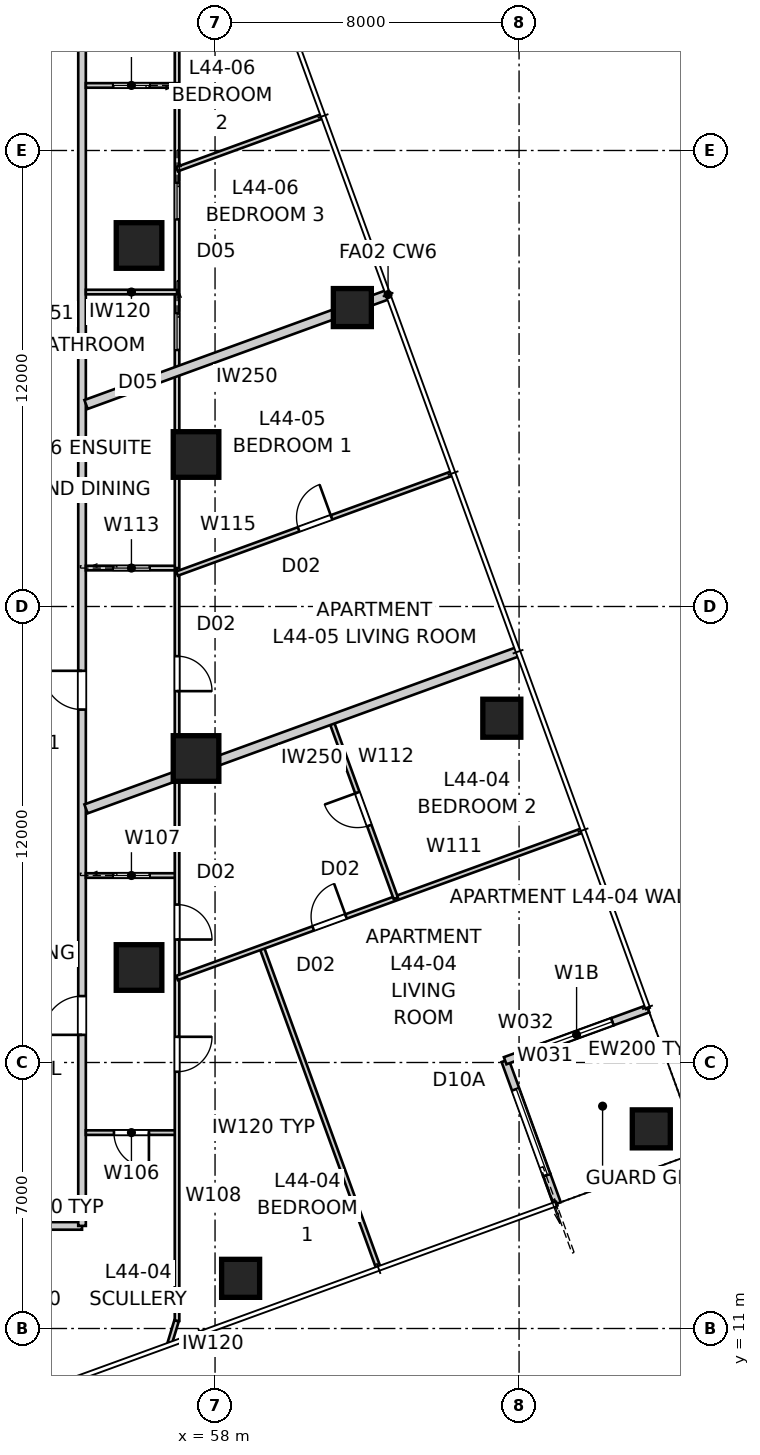
"""IFC4 building model, lengths in metres.
Left out: names, types, materials, properties, quantities, classifications, styles, units other than length and angle.
Written with IfcOpenShell. Run it as: python <this file> out.ifc"""

import sys

from ifc_helpers import new_model, si_unit, direction, frame, frame_2d, origin, origin_2d, place, context, subcontext, project, spatial, rectangle, extrude, element, fill, save


model = new_model("IFC4")
c1 = context("Model", 3, precision=1e-05, world=origin(), true_north=direction((0.0, 1.0)))
c2 = subcontext(c1, "Body", "Model", "MODEL_VIEW")
j1 = project(units=[si_unit("LENGTHUNIT", "METRE"), si_unit("PLANEANGLEUNIT", "RADIAN")], contexts=[c1])
p1 = place(None, origin())
s1 = spatial("IfcSite", under=j1, at=p1, CompositionType="ELEMENT")
p2 = place(p1, origin())
s2 = spatial("IfcBuilding", under=s1, at=p2, CompositionType="ELEMENT")
p3 = place(p2, frame((0.0, 0.0, 160.8)))
s3 = spatial("IfcBuildingStorey", under=s2, at=p3, CompositionType="ELEMENT", Elevation=160.8)
for number, where, z_axis, x_axis in (
    (1, (58.673, 12.32, 0.0), (0.0, 0.0, 1.0), (1.0, 0.0, 0.0)),
    (2, (69.479, 16.253, 0.0), (0.0, 0.0, 1.0), (1.0, 0.0, 0.0)),
    (3, (65.546, 27.06, 0.0), (0.0, 0.0, 1.0), (1.0, 0.0, 0.0)),
    (4, (61.613, 37.866, 0.0), (0.0, 0.0, 1.0), (1.0, 0.0, 0.0)),
):
    element("IfcColumn", number, at=place(p3, frame(where, z_axis=z_axis, x_axis=x_axis)), inside=s3, PredefinedType="COLUMN", context=c2, shape_type="SweptSolid", body=[
        extrude(rectangle(XDim=1.0, YDim=1.0, at=origin_2d()), origin(), (0.0, 0.0, 1.0), 3.4),
    ])
for number, where, z_axis, x_axis in (
    (5, (57.5, 26.0, 0.0), (0.0, 0.0, 1.0), (1.0, 0.0, 0.0)),
    (6, (57.5, 34.0, 0.0), (0.0, 0.0, 1.0), (1.0, 0.0, 0.0)),
    (7, (56.0, 39.5, 0.0), (0.0, 0.0, 1.0), (1.0, 0.0, 0.0)),
    (8, (56.0, 20.5, 0.0), (0.0, 0.0, 1.0), (1.0, 0.0, 0.0)),
):
    element("IfcColumn", number, at=place(p3, frame(where, z_axis=z_axis, x_axis=x_axis)), inside=s3, PredefinedType="COLUMN", context=c2, shape_type="SweptSolid", body=[
        extrude(rectangle(XDim=1.2, YDim=1.2, at=origin_2d()), origin(), (0.0, 0.0, 1.0), 3.4),
    ])
p4 = place(p3, frame((67.002, 14.288, 0.0), z_axis=(0.0, 0.0, 1.0), x_axis=(-0.342110593602, 0.939659694648, 0.0)))
e9 = element("IfcWall", 9, at=p4, inside=s3, PredefinedType="SOLIDWALL", context=c2, shape_type="SweptSolid", body=[
    extrude(rectangle(XDim=0.8, YDim=0.2, at=frame_2d((0.4, 0.0))), origin(), (0.0, 0.0, 1.0), 3.25),
])
p5 = place(p3, frame((66.729, 15.04, 0.0), z_axis=(0.0, 0.0, 1.0), x_axis=(-0.342018703306, 0.939693144909, 0.0)))
e10 = element("IfcWall", 10, at=p5, inside=s3, PredefinedType="SOLIDWALL", context=c2, shape_type="SweptSolid", body=[
    extrude(rectangle(XDim=3.2, YDim=0.2, at=frame_2d((1.6, 0.0))), origin(), (0.0, 0.0, 1.0), 2.722),
])
p6 = place(p5, origin())
e11 = element("IfcOpeningElement", 11, at=p6, cuts=e10, PredefinedType="OPENING", context=c2, shape_type="SweptSolid", body=[
    extrude(rectangle(XDim=2.4, YDim=2.1, at=frame_2d((1.2, 1.05))), frame((0.0, 0.11, 0.0), z_axis=(0.0, -1.0, 0.0), x_axis=(1.0, 0.0, 0.0)), (0.0, 0.0, 1.0), 0.22),
])
p7 = place(p3, frame((65.634, 18.047, 0.0), z_axis=(0.0, 0.0, 1.0), x_axis=(0.939712609717, 0.341965219194, 0.0)))
e12 = element("IfcWall", 12, at=p7, inside=s3, PredefinedType="SOLIDWALL", context=c2, shape_type="SweptSolid", body=[
    extrude(rectangle(XDim=3.0, YDim=0.2, at=frame_2d((1.5, 0.0))), origin(), (0.0, 0.0, 1.0), 2.722),
])
p8 = place(p7, frame((1.0, 0.0, 0.45)))
e13 = element("IfcOpeningElement", 13, at=p8, cuts=e12, PredefinedType="OPENING", context=c2, shape_type="SweptSolid", body=[
    extrude(rectangle(XDim=2.0, YDim=1.8, at=frame_2d((1.0, 0.9))), frame((0.0, 0.11, 0.0), z_axis=(0.0, -1.0, 0.0), x_axis=(1.0, 0.0, 0.0)), (0.0, 0.0, 1.0), 0.22),
])
p9 = place(p3, frame((68.453, 19.073, 0.0), z_axis=(0.0, 0.0, 1.0), x_axis=(0.939686455819, 0.342037080957, 0.0)))
e14 = element("IfcWall", 14, at=p9, inside=s3, PredefinedType="SOLIDWALL", context=c2, shape_type="SweptSolid", body=[
    extrude(rectangle(XDim=1.0, YDim=0.2, at=frame_2d((0.5, 0.0))), origin(), (0.0, 0.0, 1.0), 3.25),
])
p10 = place(p3, frame((49.242, 13.7, 0.0), z_axis=(0.0, 0.0, 1.0), x_axis=(1.0, 0.0, 0.0)))
e15 = element("IfcWall", 15, at=p10, inside=s3, PredefinedType="PARTITIONING", context=c2, shape_type="SweptSolid", body=[
    extrude(rectangle(XDim=5.258, YDim=0.2, at=frame_2d((2.629, 0.0))), origin(), (0.0, 0.0, 1.0), 3.25),
])
p11 = place(p3, frame((54.5, 13.7, 0.0), z_axis=(0.0, 0.0, 1.0), x_axis=(0.0, 1.0, 0.0)))
e16 = element("IfcWall", 16, at=p11, inside=s3, PredefinedType="PARTITIONING", context=c2, shape_type="SweptSolid", body=[
    extrude(rectangle(XDim=33.4, YDim=0.2, at=frame_2d((16.7, 0.0))), origin(), (0.0, 0.0, 1.0), 3.25),
])
p12 = place(p11, frame((5.028, 0.0, 0.0)))
e17 = element("IfcOpeningElement", 17, at=p12, cuts=e16, PredefinedType="OPENING", context=c2, shape_type="SweptSolid", body=[
    extrude(rectangle(XDim=1.02, YDim=2.1, at=frame_2d((0.51, 1.05))), frame((0.0, 0.11, 0.0), z_axis=(0.0, -1.0, 0.0), x_axis=(1.0, 0.0, 0.0)), (0.0, 0.0, 1.0), 0.22),
])
p13 = place(p11, frame((13.587, 0.0, 0.0)))
e18 = element("IfcOpeningElement", 18, at=p13, cuts=e16, PredefinedType="OPENING", context=c2, shape_type="SweptSolid", body=[
    extrude(rectangle(XDim=1.02, YDim=2.34, at=frame_2d((0.51, 1.17))), frame((0.0, 0.11, 0.0), z_axis=(0.0, -1.0, 0.0), x_axis=(1.0, 0.0, 0.0)), (0.0, 0.0, 1.0), 0.22),
])
p14 = place(p3, frame((62.553, 38.208, 0.0), z_axis=(0.0, 0.0, 1.0), x_axis=(-0.939695617736, -0.342011909161, 0.0)))
e19 = element("IfcWall", 19, at=p14, inside=s3, PredefinedType="PARTITIONING", context=c2, shape_type="SweptSolid", body=[
    extrude(rectangle(XDim=8.458, YDim=0.25, at=frame_2d((4.229, 0.0))), origin(), (0.0, 0.0, 1.0), 3.25),
])
p15 = place(p3, frame((65.973, 28.812, 0.0), z_axis=(0.0, 0.0, 1.0), x_axis=(-0.939693801585, -0.342016899091, 0.0)))
e20 = element("IfcWall", 20, at=p15, inside=s3, PredefinedType="PARTITIONING", context=c2, shape_type="SweptSolid", body=[
    extrude(rectangle(XDim=12.097, YDim=0.25, at=frame_2d((6.049, 0.0))), origin(), (0.0, 0.0, 1.0), 3.25),
])
p16 = place(p3, frame((57.0, 16.155, 0.0), z_axis=(0.0, 0.0, 1.0), x_axis=(-1.0, 0.0, 0.0)))
e21 = element("IfcWall", 21, at=p16, inside=s3, PredefinedType="PARTITIONING", context=c2, shape_type="SweptSolid", body=[
    extrude(rectangle(XDim=2.4, YDim=0.12, at=frame_2d((1.2, 0.0))), origin(), (0.0, 0.0, 1.0), 3.25),
])
p17 = place(p16, frame((0.74, 0.0, 0.0)))
e22 = element("IfcOpeningElement", 22, at=p17, cuts=e21, PredefinedType="OPENING", context=c2, shape_type="SweptSolid", body=[
    extrude(rectangle(XDim=0.92, YDim=2.34, at=frame_2d((0.46, 1.17))), frame((0.0, 0.07, 0.0), z_axis=(0.0, -1.0, 0.0), x_axis=(1.0, 0.0, 0.0)), (0.0, 0.0, 1.0), 0.14),
])
p18 = place(p3, frame((54.6, 22.921, 0.0), z_axis=(0.0, 0.0, 1.0), x_axis=(1.0, 0.0, 0.0)))
e23 = element("IfcWall", 23, at=p18, inside=s3, PredefinedType="PARTITIONING", context=c2, shape_type="SweptSolid", body=[
    extrude(rectangle(XDim=2.4, YDim=0.12, at=frame_2d((1.2, 0.0))), origin(), (0.0, 0.0, 1.0), 3.25),
])
p19 = place(p18, frame((0.72, 0.0, 0.0)))
e24 = element("IfcOpeningElement", 24, at=p19, cuts=e23, PredefinedType="OPENING", context=c2, shape_type="SweptSolid", body=[
    extrude(rectangle(XDim=0.96, YDim=2.1, at=frame_2d((0.48, 1.05))), frame((0.0, 0.07, 0.0), z_axis=(0.0, -1.0, 0.0), x_axis=(1.0, 0.0, 0.0)), (0.0, 0.0, 1.0), 0.14),
])
p20 = place(p3, frame((57.0, 30.92, 0.0), z_axis=(0.0, 0.0, 1.0), x_axis=(0.0, -1.0, 0.0)))
e25 = element("IfcWall", 25, at=p20, inside=s3, PredefinedType="PARTITIONING", context=c2, shape_type="SweptSolid", body=[
    extrude(rectangle(XDim=19.72, YDim=0.12, at=frame_2d((9.86, 0.0))), origin(), (0.0, 0.0, 1.0), 2.55),
])
p21 = place(p20, frame((12.243, 0.0, 0.0)))
e26 = element("IfcOpeningElement", 26, at=p21, cuts=e25, PredefinedType="OPENING", context=c2, shape_type="SweptSolid", body=[
    extrude(rectangle(XDim=0.92, YDim=2.34, at=frame_2d((0.46, 1.17))), frame((0.0, 0.07, 0.0), z_axis=(0.0, -1.0, 0.0), x_axis=(1.0, 0.0, 0.0)), (0.0, 0.0, 1.0), 0.14),
])
p22 = place(p20, frame((8.764, 0.0, 0.0)))
e27 = element("IfcOpeningElement", 27, at=p22, cuts=e25, PredefinedType="OPENING", context=c2, shape_type="SweptSolid", body=[
    extrude(rectangle(XDim=0.92, YDim=2.34, at=frame_2d((0.46, 1.17))), frame((0.0, 0.07, 0.0), z_axis=(0.0, -1.0, 0.0), x_axis=(1.0, 0.0, 0.0)), (0.0, 0.0, 1.0), 0.14),
])
p23 = place(p20, frame((2.227, 0.0, 0.0)))
e28 = element("IfcOpeningElement", 28, at=p23, cuts=e25, PredefinedType="OPENING", context=c2, shape_type="SweptSolid", body=[
    extrude(rectangle(XDim=0.92, YDim=2.34, at=frame_2d((0.46, 1.17))), frame((0.0, 0.07, 0.0), z_axis=(0.0, -1.0, 0.0), x_axis=(1.0, 0.0, 0.0)), (0.0, 0.0, 1.0), 0.14),
])
p24 = place(p3, frame((56.987, 11.2, 0.0), z_axis=(0.0, 0.0, 1.0), x_axis=(-0.290455219909, -0.956888585588, 0.0)))
e29 = element("IfcWall", 29, at=p24, inside=s3, PredefinedType="PARTITIONING", context=c2, shape_type="SweptSolid", body=[
    extrude(rectangle(XDim=0.605, YDim=0.12, at=frame_2d((0.303, 0.0))), origin(), (0.0, 0.0, 1.0), 3.25),
])
p25 = place(p3, frame((62.29, 12.615, 0.0), z_axis=(0.0, 0.0, 1.0), x_axis=(-0.342038393654, 0.939685978009, 0.0)))
e30 = element("IfcWall", 30, at=p25, inside=s3, PredefinedType="PARTITIONING", context=c2, shape_type="SweptSolid", body=[
    extrude(rectangle(XDim=8.96, YDim=0.12, at=frame_2d((4.48, 0.0))), origin(), (0.0, 0.0, 1.0), 3.25),
])
p26 = place(p3, frame((57.0, 20.225, 0.0), z_axis=(0.0, 0.0, 1.0), x_axis=(0.939693965364, 0.342016449105, 0.0)))
e31 = element("IfcWall", 31, at=p26, inside=s3, PredefinedType="PARTITIONING", context=c2, shape_type="SweptSolid", body=[
    extrude(rectangle(XDim=11.328, YDim=0.12, at=frame_2d((5.664, 0.0))), origin(), (0.0, 0.0, 1.0), 3.25),
])
p27 = place(p26, frame((3.812, 0.0, 0.0)))
e32 = element("IfcOpeningElement", 32, at=p27, cuts=e31, PredefinedType="OPENING", context=c2, shape_type="SweptSolid", body=[
    extrude(rectangle(XDim=0.92, YDim=2.34, at=frame_2d((0.46, 1.17))), frame((0.0, 0.07, 0.0), z_axis=(0.0, -1.0, 0.0), x_axis=(1.0, 0.0, 0.0)), (0.0, 0.0, 1.0), 0.14),
])
p28 = place(p3, frame((62.757, 22.32, 0.0), z_axis=(0.0, 0.0, 1.0), x_axis=(-0.341993964619, 0.939702148643, 0.0)))
e33 = element("IfcWall", 33, at=p28, inside=s3, PredefinedType="PARTITIONING", context=c2, shape_type="SweptSolid", body=[
    extrude(rectangle(XDim=5.0, YDim=0.12, at=frame_2d((2.5, 0.0))), origin(), (0.0, 0.0, 1.0), 3.25),
])
p29 = place(p28, frame((2.04, 0.0, 0.0)))
e34 = element("IfcOpeningElement", 34, at=p29, cuts=e33, PredefinedType="OPENING", context=c2, shape_type="SweptSolid", body=[
    extrude(rectangle(XDim=0.92, YDim=2.34, at=frame_2d((0.46, 1.17))), frame((0.0, 0.07, 0.0), z_axis=(0.0, -1.0, 0.0), x_axis=(1.0, 0.0, 0.0)), (0.0, 0.0, 1.0), 0.14),
])
p30 = place(p3, frame((54.6, 31.011, 0.0), z_axis=(0.0, 0.0, 1.0), x_axis=(1.0, 0.0, 0.0)))
e35 = element("IfcWall", 35, at=p30, inside=s3, PredefinedType="PARTITIONING", context=c2, shape_type="SweptSolid", body=[
    extrude(rectangle(XDim=2.4, YDim=0.12, at=frame_2d((1.2, 0.0))), origin(), (0.0, 0.0, 1.0), 3.25),
])
p31 = place(p30, frame((0.72, 0.0, 0.0)))
e36 = element("IfcOpeningElement", 36, at=p31, cuts=e35, PredefinedType="OPENING", context=c2, shape_type="SweptSolid", body=[
    extrude(rectangle(XDim=0.96, YDim=2.1, at=frame_2d((0.48, 1.05))), frame((0.0, 0.07, 0.0), z_axis=(0.0, -1.0, 0.0), x_axis=(1.0, 0.0, 0.0)), (0.0, 0.0, 1.0), 0.14),
])
p32 = place(p3, frame((57.0, 49.6, 0.0), z_axis=(0.0, 0.0, 1.0), x_axis=(0.0, -1.0, 0.0)))
e37 = element("IfcWall", 37, at=p32, inside=s3, PredefinedType="PARTITIONING", context=c2, shape_type="SweptSolid", body=[
    extrude(rectangle(XDim=18.589, YDim=0.12, at=frame_2d((9.294, 0.0))), origin(), (0.0, 0.0, 1.0), 2.55),
])
p33 = place(p32, frame((8.452, 0.0, 0.0)))
e38 = element("IfcOpeningElement", 38, at=p33, cuts=e37, PredefinedType="OPENING", context=c2, shape_type="SweptSolid", body=[
    extrude(rectangle(XDim=0.96, YDim=2.1, at=frame_2d((0.48, 1.05))), frame((0.0, 0.07, 0.0), z_axis=(0.0, -1.0, 0.0), x_axis=(1.0, 0.0, 0.0)), (0.0, 0.0, 1.0), 0.14),
])
p34 = place(p32, frame((11.889, 0.0, 0.0)))
e39 = element("IfcOpeningElement", 39, at=p34, cuts=e37, PredefinedType="OPENING", context=c2, shape_type="SweptSolid", body=[
    extrude(rectangle(XDim=0.96, YDim=2.1, at=frame_2d((0.48, 1.05))), frame((0.0, 0.07, 0.0), z_axis=(0.0, -1.0, 0.0), x_axis=(1.0, 0.0, 0.0)), (0.0, 0.0, 1.0), 0.14),
])
p35 = place(p3, frame((57.0, 30.866, 0.0), z_axis=(0.0, 0.0, 1.0), x_axis=(0.939685835373, 0.342038785519, 0.0)))
e40 = element("IfcWall", 40, at=p35, inside=s3, PredefinedType="PARTITIONING", context=c2, shape_type="SweptSolid", body=[
    extrude(rectangle(XDim=7.689, YDim=0.12, at=frame_2d((3.844, 0.0))), origin(), (0.0, 0.0, 1.0), 3.25),
])
p36 = place(p35, frame((3.404, 0.0, 0.0)))
e41 = element("IfcOpeningElement", 41, at=p36, cuts=e40, PredefinedType="OPENING", context=c2, shape_type="SweptSolid", body=[
    extrude(rectangle(XDim=0.92, YDim=2.34, at=frame_2d((0.46, 1.17))), frame((0.0, 0.07, 0.0), z_axis=(0.0, -1.0, 0.0), x_axis=(1.0, 0.0, 0.0)), (0.0, 0.0, 1.0), 0.14),
])
p37 = place(p3, frame((57.0, 43.712, 0.0), z_axis=(0.0, 0.0, 1.0), x_axis=(-1.0, 0.0, 0.0)))
e42 = element("IfcWall", 42, at=p37, inside=s3, PredefinedType="PARTITIONING", context=c2, shape_type="SweptSolid", body=[
    extrude(rectangle(XDim=2.4, YDim=0.12, at=frame_2d((1.2, 0.0))), origin(), (0.0, 0.0, 1.0), 3.25),
])
p38 = place(p37, frame((0.72, 0.0, 0.0)))
e43 = element("IfcOpeningElement", 43, at=p38, cuts=e42, PredefinedType="OPENING", context=c2, shape_type="SweptSolid", body=[
    extrude(rectangle(XDim=0.96, YDim=2.1, at=frame_2d((0.48, 1.05))), frame((0.0, 0.07, 0.0), z_axis=(0.0, -1.0, 0.0), x_axis=(1.0, 0.0, 0.0)), (0.0, 0.0, 1.0), 0.14),
])
p39 = place(p3, frame((57.0, 38.275, 0.0), z_axis=(0.0, 0.0, 1.0), x_axis=(-1.0, 0.0, 0.0)))
e44 = element("IfcWall", 44, at=p39, inside=s3, PredefinedType="PARTITIONING", context=c2, shape_type="SweptSolid", body=[
    extrude(rectangle(XDim=2.4, YDim=0.12, at=frame_2d((1.2, 0.0))), origin(), (0.0, 0.0, 1.0), 3.25),
])
p40 = place(p3, frame((60.805, 42.893, 0.0), z_axis=(0.0, 0.0, 1.0), x_axis=(-0.939682468191, -0.342048036063, 0.0)))
e45 = element("IfcWall", 45, at=p40, inside=s3, PredefinedType="PARTITIONING", context=c2, shape_type="SweptSolid", body=[
    extrude(rectangle(XDim=4.049, YDim=0.12, at=frame_2d((2.024, 0.0))), origin(), (0.0, 0.0, 1.0), 3.25),
])
p41 = place(p6, origin())
e46 = element("IfcDoor", 46, at=p41, inside=s3, OperationType="SLIDING_TO_LEFT", PredefinedType="DOOR", context=c2, shape_type="SweptSolid", body=[
    extrude(rectangle(XDim=2.4, YDim=2.1, at=frame_2d((1.2, 1.05))), frame((0.0, 0.025, 0.0), z_axis=(0.0, -1.0, 0.0), x_axis=(1.0, 0.0, 0.0)), (0.0, 0.0, 1.0), 0.05),
])
fill(e11, e46)
p42 = place(p8, origin())
e47 = element("IfcWindow", 47, at=p42, inside=s3, PartitioningType="SINGLE_PANEL", PredefinedType="WINDOW", context=c2, shape_type="SweptSolid", body=[
    extrude(rectangle(XDim=2.0, YDim=1.8, at=frame_2d((1.0, 0.9))), frame((0.0, 0.03, 0.0), z_axis=(0.0, -1.0, 0.0), x_axis=(1.0, 0.0, 0.0)), (0.0, 0.0, 1.0), 0.06),
])
fill(e13, e47)
p43 = place(p12, origin())
e48 = element("IfcDoor", 48, at=p43, inside=s3, OperationType="SINGLE_SWING_LEFT", PredefinedType="DOOR", context=c2, shape_type="SweptSolid", body=[
    extrude(rectangle(XDim=1.02, YDim=2.1, at=frame_2d((0.51, 1.05))), frame((0.0, 0.025, 0.0), z_axis=(0.0, -1.0, 0.0), x_axis=(1.0, 0.0, 0.0)), (0.0, 0.0, 1.0), 0.05),
])
fill(e17, e48)
p44 = place(p13, origin())
e49 = element("IfcDoor", 49, at=p44, inside=s3, OperationType="SINGLE_SWING_RIGHT", PredefinedType="DOOR", context=c2, shape_type="SweptSolid", body=[
    extrude(rectangle(XDim=1.02, YDim=2.34, at=frame_2d((0.51, 1.17))), frame((0.0, 0.025, 0.0), z_axis=(0.0, -1.0, 0.0), x_axis=(1.0, 0.0, 0.0)), (0.0, 0.0, 1.0), 0.05),
])
fill(e18, e49)
p45 = place(p38, origin())
e50 = element("IfcDoor", 50, at=p45, inside=s3, OperationType="SLIDING_TO_LEFT", PredefinedType="DOOR", context=c2, shape_type="SweptSolid", body=[
    extrude(rectangle(XDim=0.96, YDim=2.1, at=frame_2d((0.48, 1.05))), frame((0.0, 0.025, 0.0), z_axis=(0.0, -1.0, 0.0), x_axis=(1.0, 0.0, 0.0)), (0.0, 0.0, 1.0), 0.05),
])
fill(e43, e50)
p46 = place(p21, origin())
e51 = element("IfcDoor", 51, at=p46, inside=s3, OperationType="SINGLE_SWING_LEFT", PredefinedType="DOOR", context=c2, shape_type="SweptSolid", body=[
    extrude(rectangle(XDim=0.92, YDim=2.34, at=frame_2d((0.46, 1.17))), frame((0.0, 0.025, 0.0), z_axis=(0.0, -1.0, 0.0), x_axis=(1.0, 0.0, 0.0)), (0.0, 0.0, 1.0), 0.05),
])
fill(e26, e51)
p47 = place(p22, origin())
e52 = element("IfcDoor", 52, at=p47, inside=s3, OperationType="SINGLE_SWING_RIGHT", PredefinedType="DOOR", context=c2, shape_type="SweptSolid", body=[
    extrude(rectangle(XDim=0.92, YDim=2.34, at=frame_2d((0.46, 1.17))), frame((0.0, 0.025, 0.0), z_axis=(0.0, -1.0, 0.0), x_axis=(1.0, 0.0, 0.0)), (0.0, 0.0, 1.0), 0.05),
])
fill(e27, e52)
p48 = place(p17, origin())
e53 = element("IfcDoor", 53, at=p48, inside=s3, OperationType="SINGLE_SWING_LEFT", PredefinedType="DOOR", context=c2, shape_type="SweptSolid", body=[
    extrude(rectangle(XDim=0.92, YDim=2.34, at=frame_2d((0.46, 1.17))), frame((0.0, 0.025, 0.0), z_axis=(0.0, -1.0, 0.0), x_axis=(1.0, 0.0, 0.0)), (0.0, 0.0, 1.0), 0.05),
])
fill(e22, e53)
p49 = place(p19, origin())
e54 = element("IfcDoor", 54, at=p49, inside=s3, OperationType="SLIDING_TO_LEFT", PredefinedType="DOOR", context=c2, shape_type="SweptSolid", body=[
    extrude(rectangle(XDim=0.96, YDim=2.1, at=frame_2d((0.48, 1.05))), frame((0.0, 0.025, 0.0), z_axis=(0.0, -1.0, 0.0), x_axis=(1.0, 0.0, 0.0)), (0.0, 0.0, 1.0), 0.05),
])
fill(e24, e54)
p50 = place(p23, origin())
e55 = element("IfcDoor", 55, at=p50, inside=s3, OperationType="SINGLE_SWING_RIGHT", PredefinedType="DOOR", context=c2, shape_type="SweptSolid", body=[
    extrude(rectangle(XDim=0.92, YDim=2.34, at=frame_2d((0.46, 1.17))), frame((0.0, 0.025, 0.0), z_axis=(0.0, -1.0, 0.0), x_axis=(1.0, 0.0, 0.0)), (0.0, 0.0, 1.0), 0.05),
])
fill(e28, e55)
p51 = place(p31, origin())
e56 = element("IfcDoor", 56, at=p51, inside=s3, OperationType="SLIDING_TO_LEFT", PredefinedType="DOOR", context=c2, shape_type="SweptSolid", body=[
    extrude(rectangle(XDim=0.96, YDim=2.1, at=frame_2d((0.48, 1.05))), frame((0.0, 0.025, 0.0), z_axis=(0.0, -1.0, 0.0), x_axis=(1.0, 0.0, 0.0)), (0.0, 0.0, 1.0), 0.05),
])
fill(e36, e56)
p52 = place(p33, origin())
e57 = element("IfcDoor", 57, at=p52, inside=s3, OperationType="SLIDING_TO_LEFT", PredefinedType="DOOR", context=c2, shape_type="SweptSolid", body=[
    extrude(rectangle(XDim=0.96, YDim=2.1, at=frame_2d((0.48, 1.05))), frame((0.0, 0.025, 0.0), z_axis=(0.0, -1.0, 0.0), x_axis=(1.0, 0.0, 0.0)), (0.0, 0.0, 1.0), 0.05),
])
fill(e38, e57)
p53 = place(p29, origin())
e58 = element("IfcDoor", 58, at=p53, inside=s3, OperationType="SINGLE_SWING_RIGHT", PredefinedType="DOOR", context=c2, shape_type="SweptSolid", body=[
    extrude(rectangle(XDim=0.92, YDim=2.34, at=frame_2d((0.46, 1.17))), frame((0.0, 0.025, 0.0), z_axis=(0.0, -1.0, 0.0), x_axis=(1.0, 0.0, 0.0)), (0.0, 0.0, 1.0), 0.05),
])
fill(e34, e58)
p54 = place(p27, origin())
e59 = element("IfcDoor", 59, at=p54, inside=s3, OperationType="SINGLE_SWING_RIGHT", PredefinedType="DOOR", context=c2, shape_type="SweptSolid", body=[
    extrude(rectangle(XDim=0.92, YDim=2.34, at=frame_2d((0.46, 1.17))), frame((0.0, 0.025, 0.0), z_axis=(0.0, -1.0, 0.0), x_axis=(1.0, 0.0, 0.0)), (0.0, 0.0, 1.0), 0.05),
])
fill(e32, e59)
p55 = place(p36, origin())
e60 = element("IfcDoor", 60, at=p55, inside=s3, OperationType="SINGLE_SWING_RIGHT", PredefinedType="DOOR", context=c2, shape_type="SweptSolid", body=[
    extrude(rectangle(XDim=0.92, YDim=2.34, at=frame_2d((0.46, 1.17))), frame((0.0, 0.025, 0.0), z_axis=(0.0, -1.0, 0.0), x_axis=(1.0, 0.0, 0.0)), (0.0, 0.0, 1.0), 0.05),
])
fill(e41, e60)
p56 = place(p34, origin())
e61 = element("IfcDoor", 61, at=p56, inside=s3, OperationType="SLIDING_TO_LEFT", PredefinedType="DOOR", context=c2, shape_type="SweptSolid", body=[
    extrude(rectangle(XDim=0.96, YDim=2.1, at=frame_2d((0.48, 1.05))), frame((0.0, 0.025, 0.0), z_axis=(0.0, -1.0, 0.0), x_axis=(1.0, 0.0, 0.0)), (0.0, 0.0, 1.0), 0.05),
])
fill(e39, e61)
save(model, sys.argv[1])
